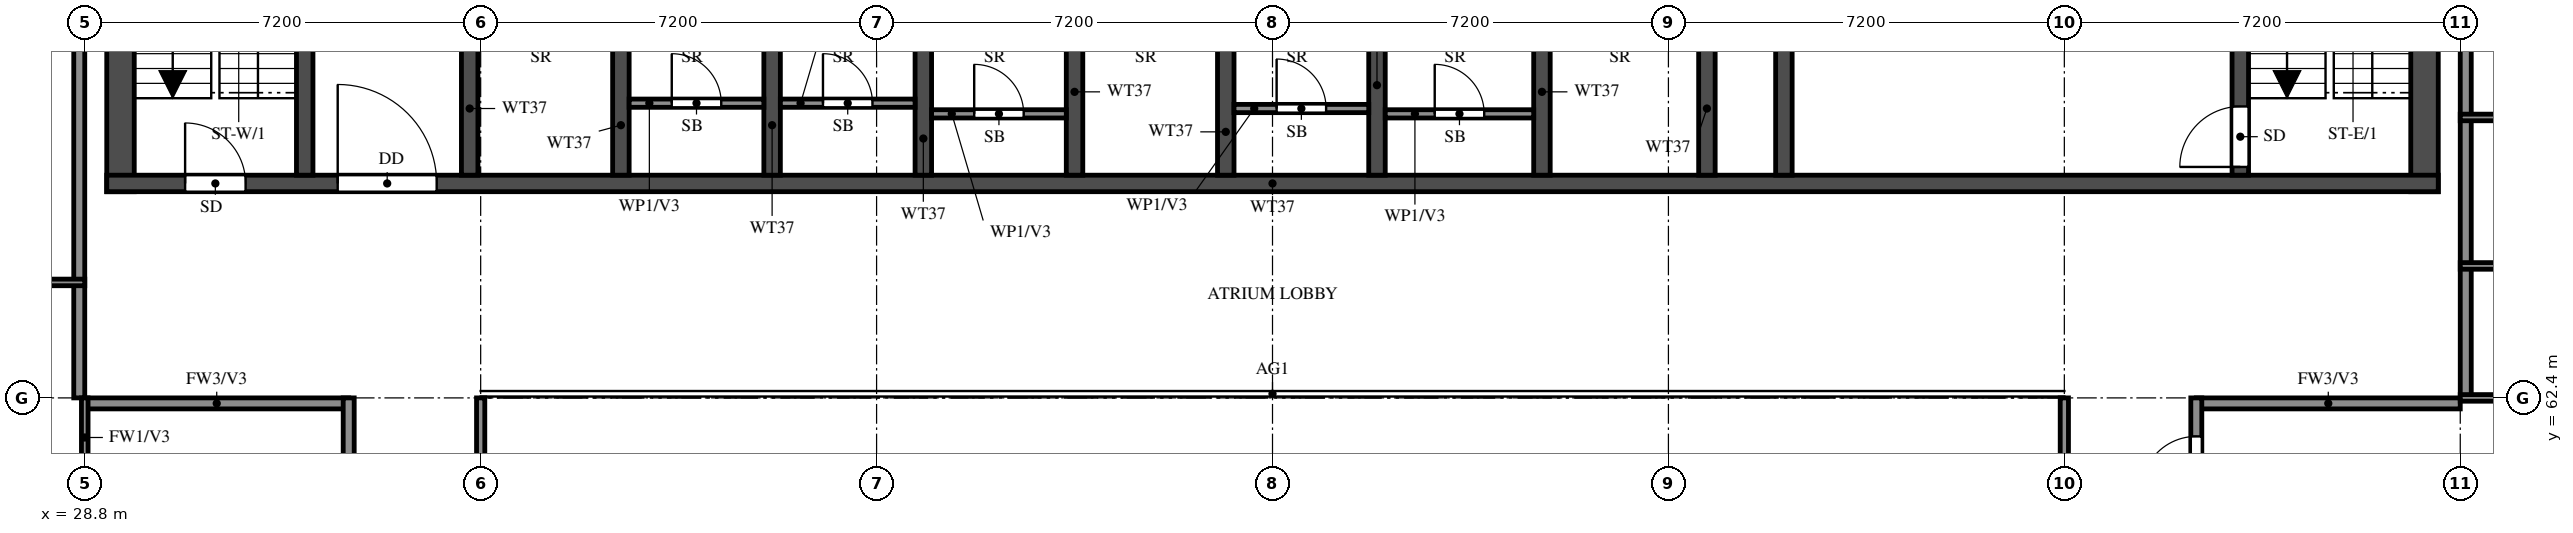
"""IFC4 building model, lengths in metres.
Left out: names, types, materials, properties, quantities, classifications, styles, units other than length and angle.
Written with IfcOpenShell. Run it as: python <this file> out.ifc"""

import sys

from ifc_helpers import new_model, si_unit, direction, frame, frame_2d, origin, place, context, subcontext, project, spatial, rectangle, extrude, element, fill, save


model = new_model("IFC4")
c1 = context("Model", 3, precision=1e-05, world=origin(), true_north=direction((0.0, 1.0)))
c2 = subcontext(c1, "Body", "Model", "MODEL_VIEW")
j1 = project(units=[si_unit("LENGTHUNIT", "METRE"), si_unit("PLANEANGLEUNIT", "RADIAN")], contexts=[c1])
p1 = place(None, origin())
s1 = spatial("IfcSite", under=j1, at=p1, CompositionType="ELEMENT")
p2 = place(p1, origin())
s2 = spatial("IfcBuilding", under=s1, at=p2, CompositionType="ELEMENT")
p3 = place(p2, frame((0.0, 0.0, 253.5)))
s3 = spatial("IfcBuildingStorey", under=s2, at=p3, CompositionType="ELEMENT", Elevation=253.5)
for number, where, z_axis, x_axis in (
    (1, (29.45, 66.15, 0.0), (0.0, 0.0, 1.0), (0.0, 1.0, 0.0)),
    (2, (71.35, 66.15, 0.0), (0.0, 0.0, 1.0), (0.0, 1.0, 0.0)),
):
    element("IfcWall", number, at=place(p3, frame(where, z_axis=z_axis, x_axis=x_axis)), inside=s3, PredefinedType="SHEAR", context=c2, shape_type="SweptSolid", body=[
        extrude(rectangle(XDim=11.85, YDim=0.5, at=frame_2d((5.925, 0.0))), origin(), (0.0, 0.0, 1.0), 3.22),
    ])
p4 = place(p3, frame((29.2, 66.3, 0.0), z_axis=(0.0, 0.0, 1.0), x_axis=(1.0, 0.0, 0.0)))
e3 = element("IfcWall", 3, at=p4, inside=s3, PredefinedType="SHEAR", context=c2, shape_type="SweptSolid", body=[
    extrude(rectangle(XDim=42.4, YDim=0.3, at=frame_2d((21.2, 0.0))), origin(), (0.0, 0.0, 1.0), 3.22),
])
p5 = place(p4, frame((1.425, 0.0, 0.0)))
e4 = element("IfcOpeningElement", 4, at=p5, cuts=e3, PredefinedType="OPENING", context=c2, shape_type="SweptSolid", body=[
    extrude(rectangle(XDim=1.1, YDim=2.1, at=frame_2d((0.55, 1.05))), frame((0.0, 0.16, 0.0), z_axis=(0.0, -1.0, 0.0), x_axis=(1.0, 0.0, 0.0)), (0.0, 0.0, 1.0), 0.32),
])
p6 = place(p4, frame((4.2, 0.0, 0.0)))
e5 = element("IfcOpeningElement", 5, at=p6, cuts=e3, PredefinedType="OPENING", context=c2, shape_type="SweptSolid", body=[
    extrude(rectangle(XDim=1.8, YDim=2.1, at=frame_2d((0.9, 1.05))), frame((0.0, 0.16, 0.0), z_axis=(0.0, -1.0, 0.0), x_axis=(1.0, 0.0, 0.0)), (0.0, 0.0, 1.0), 0.32),
])
p7 = place(p3, frame((32.8, 66.45, 0.0), z_axis=(0.0, 0.0, 1.0), x_axis=(0.0, 1.0, 0.0)))
e6 = element("IfcWall", 6, at=p7, inside=s3, PredefinedType="SHEAR", context=c2, shape_type="SweptSolid", body=[
    extrude(rectangle(XDim=11.05, YDim=0.3, at=frame_2d((5.525, 0.0))), origin(), (0.0, 0.0, 1.0), 3.22),
])
p8 = place(p3, frame((68.0, 66.45, 0.0), z_axis=(0.0, 0.0, 1.0), x_axis=(0.0, 1.0, 0.0)))
e7 = element("IfcWall", 7, at=p8, inside=s3, PredefinedType="SHEAR", context=c2, shape_type="SweptSolid", body=[
    extrude(rectangle(XDim=11.05, YDim=0.3, at=frame_2d((5.525, 0.0))), origin(), (0.0, 0.0, 1.0), 3.22),
])
p9 = place(p8, frame((0.15, 0.0, 0.0)))
e8 = element("IfcOpeningElement", 8, at=p9, cuts=e7, PredefinedType="OPENING", context=c2, shape_type="SweptSolid", body=[
    extrude(rectangle(XDim=1.1, YDim=2.1, at=frame_2d((0.55, 1.05))), frame((0.0, 0.16, 0.0), z_axis=(0.0, -1.0, 0.0), x_axis=(1.0, 0.0, 0.0)), (0.0, 0.0, 1.0), 0.32),
])
p10 = place(p3, frame((59.7, 66.45, 0.0), z_axis=(0.0, 0.0, 1.0), x_axis=(0.0, 1.0, 0.0)))
e9 = element("IfcWall", 9, at=p10, inside=s3, PredefinedType="SHEAR", context=c2, shape_type="SweptSolid", body=[
    extrude(rectangle(XDim=6.175, YDim=0.3, at=frame_2d((3.087, 0.0))), origin(), (0.0, 0.0, 1.0), 3.22),
])
p11 = place(p10, frame((3.85, 0.0, 0.0)))
e10 = element("IfcOpeningElement", 10, at=p11, cuts=e9, PredefinedType="OPENING", context=c2, shape_type="SweptSolid", body=[
    extrude(rectangle(XDim=1.2, YDim=2.1, at=frame_2d((0.6, 1.05))), frame((0.0, 0.16, 0.0), z_axis=(0.0, -1.0, 0.0), x_axis=(1.0, 0.0, 0.0)), (0.0, 0.0, 1.0), 0.32),
])
for number, where, z_axis, x_axis in (
    (11, (35.8, 66.45, 0.0), (0.0, 0.0, 1.0), (0.0, 1.0, 0.0)),
    (12, (38.55, 66.45, 0.0), (0.0, 0.0, 1.0), (0.0, 1.0, 0.0)),
    (13, (41.3, 66.45, 0.0), (0.0, 0.0, 1.0), (0.0, 1.0, 0.0)),
    (14, (44.05, 66.45, 0.0), (0.0, 0.0, 1.0), (0.0, 1.0, 0.0)),
    (15, (46.8, 66.45, 0.0), (0.0, 0.0, 1.0), (0.0, 1.0, 0.0)),
    (16, (49.55, 66.45, 0.0), (0.0, 0.0, 1.0), (0.0, 1.0, 0.0)),
    (17, (52.3, 66.45, 0.0), (0.0, 0.0, 1.0), (0.0, 1.0, 0.0)),
    (18, (55.3, 66.45, 0.0), (0.0, 0.0, 1.0), (0.0, 1.0, 0.0)),
    (19, (58.3, 66.45, 0.0), (0.0, 0.0, 1.0), (0.0, 1.0, 0.0)),
):
    element("IfcWall", number, at=place(p3, frame(where, z_axis=z_axis, x_axis=x_axis)), inside=s3, PredefinedType="SHEAR", context=c2, shape_type="SweptSolid", body=[
        extrude(rectangle(XDim=2.425, YDim=0.3, at=frame_2d((1.212, 0.0))), origin(), (0.0, 0.0, 1.0), 3.22),
    ])
p12 = place(p3, frame((38.7, 67.76, 0.0), z_axis=(0.0, 0.0, 1.0), x_axis=(1.0, 0.0, 0.0)))
e20 = element("IfcWall", 20, at=p12, inside=s3, PredefinedType="PARTITIONING", context=c2, shape_type="SweptSolid", body=[
    extrude(rectangle(XDim=2.45, YDim=0.15, at=frame_2d((1.225, 0.0))), origin(), (0.0, 0.0, 1.0), 3.22),
])
p13 = place(p12, frame((0.775, 0.0, 0.0)))
e21 = element("IfcOpeningElement", 21, at=p13, cuts=e20, PredefinedType="OPENING", context=c2, shape_type="SweptSolid", body=[
    extrude(rectangle(XDim=0.9, YDim=2.1, at=frame_2d((0.45, 1.05))), frame((0.0, 0.085, 0.0), z_axis=(0.0, -1.0, 0.0), x_axis=(1.0, 0.0, 0.0)), (0.0, 0.0, 1.0), 0.17),
])
p14 = place(p3, frame((41.45, 67.76, 0.0), z_axis=(0.0, 0.0, 1.0), x_axis=(1.0, 0.0, 0.0)))
e22 = element("IfcWall", 22, at=p14, inside=s3, PredefinedType="PARTITIONING", context=c2, shape_type="SweptSolid", body=[
    extrude(rectangle(XDim=2.45, YDim=0.15, at=frame_2d((1.225, 0.0))), origin(), (0.0, 0.0, 1.0), 3.22),
])
p15 = place(p14, frame((0.775, 0.0, 0.0)))
e23 = element("IfcOpeningElement", 23, at=p15, cuts=e22, PredefinedType="OPENING", context=c2, shape_type="SweptSolid", body=[
    extrude(rectangle(XDim=0.9, YDim=2.1, at=frame_2d((0.45, 1.05))), frame((0.0, 0.085, 0.0), z_axis=(0.0, -1.0, 0.0), x_axis=(1.0, 0.0, 0.0)), (0.0, 0.0, 1.0), 0.17),
])
p16 = place(p3, frame((44.2, 67.565, 0.0), z_axis=(0.0, 0.0, 1.0), x_axis=(1.0, 0.0, 0.0)))
e24 = element("IfcWall", 24, at=p16, inside=s3, PredefinedType="PARTITIONING", context=c2, shape_type="SweptSolid", body=[
    extrude(rectangle(XDim=2.45, YDim=0.15, at=frame_2d((1.225, 0.0))), origin(), (0.0, 0.0, 1.0), 3.22),
])
p17 = place(p16, frame((0.775, 0.0, 0.0)))
e25 = element("IfcOpeningElement", 25, at=p17, cuts=e24, PredefinedType="OPENING", context=c2, shape_type="SweptSolid", body=[
    extrude(rectangle(XDim=0.9, YDim=2.1, at=frame_2d((0.45, 1.05))), frame((0.0, 0.085, 0.0), z_axis=(0.0, -1.0, 0.0), x_axis=(1.0, 0.0, 0.0)), (0.0, 0.0, 1.0), 0.17),
])
p18 = place(p3, frame((49.7, 67.663, 0.0), z_axis=(0.0, 0.0, 1.0), x_axis=(1.0, 0.0, 0.0)))
e26 = element("IfcWall", 26, at=p18, inside=s3, PredefinedType="PARTITIONING", context=c2, shape_type="SweptSolid", body=[
    extrude(rectangle(XDim=2.45, YDim=0.15, at=frame_2d((1.225, 0.0))), origin(), (0.0, 0.0, 1.0), 3.22),
])
p19 = place(p18, frame((0.775, 0.0, 0.0)))
e27 = element("IfcOpeningElement", 27, at=p19, cuts=e26, PredefinedType="OPENING", context=c2, shape_type="SweptSolid", body=[
    extrude(rectangle(XDim=0.9, YDim=2.1, at=frame_2d((0.45, 1.05))), frame((0.0, 0.085, 0.0), z_axis=(0.0, -1.0, 0.0), x_axis=(1.0, 0.0, 0.0)), (0.0, 0.0, 1.0), 0.17),
])
p20 = place(p3, frame((52.45, 67.565, 0.0), z_axis=(0.0, 0.0, 1.0), x_axis=(1.0, 0.0, 0.0)))
e28 = element("IfcWall", 28, at=p20, inside=s3, PredefinedType="PARTITIONING", context=c2, shape_type="SweptSolid", body=[
    extrude(rectangle(XDim=2.7, YDim=0.15, at=frame_2d((1.35, 0.0))), origin(), (0.0, 0.0, 1.0), 3.22),
])
p21 = place(p20, frame((0.9, 0.0, 0.0)))
e29 = element("IfcOpeningElement", 29, at=p21, cuts=e28, PredefinedType="OPENING", context=c2, shape_type="SweptSolid", body=[
    extrude(rectangle(XDim=0.9, YDim=2.1, at=frame_2d((0.45, 1.05))), frame((0.0, 0.085, 0.0), z_axis=(0.0, -1.0, 0.0), x_axis=(1.0, 0.0, 0.0)), (0.0, 0.0, 1.0), 0.17),
])
for number, where, z_axis, x_axis in (
    (30, (28.8, 62.3, 0.0), (0.0, 0.0, 1.0), (1.0, 0.0, 0.0)),
    (31, (67.2, 62.3, 0.0), (0.0, 0.0, 1.0), (1.0, 0.0, 0.0)),
):
    element("IfcWall", number, at=place(p3, frame(where, z_axis=z_axis, x_axis=x_axis)), inside=s3, PredefinedType="SOLIDWALL", context=c2, shape_type="SweptSolid", body=[
        extrude(rectangle(XDim=4.8, YDim=0.2, at=frame_2d((2.4, 0.0))), origin(), (0.0, 0.0, 1.0), 3.22),
    ])
p22 = place(p3, frame((28.7, 62.4, 0.0), z_axis=(0.0, 0.0, 1.0), x_axis=(0.0, 1.0, 0.0)))
e32 = element("IfcWall", 32, at=p22, inside=s3, PredefinedType="SOLIDWALL", context=c2, shape_type="SweptSolid", body=[
    extrude(rectangle(XDim=15.6, YDim=0.2, at=frame_2d((7.8, 0.0))), origin(), (0.0, 0.0, 1.0), 3.22),
])
p23 = place(p3, frame((33.6, 56.4, 0.0), z_axis=(0.0, 0.0, 1.0), x_axis=(0.0, 1.0, 0.0)))
e33 = element("IfcWall", 33, at=p23, inside=s3, PredefinedType="SOLIDWALL", context=c2, shape_type="SweptSolid", body=[
    extrude(rectangle(XDim=6.0, YDim=0.2, at=frame_2d((3.0, 0.0))), origin(), (0.0, 0.0, 1.0), 3.22),
])
p24 = place(p23, frame((3.7, 0.0, 0.0)))
e34 = element("IfcOpeningElement", 34, at=p24, cuts=e33, PredefinedType="OPENING", context=c2, shape_type="SweptSolid", body=[
    extrude(rectangle(XDim=1.0, YDim=2.1, at=frame_2d((0.5, 1.05))), frame((0.0, 0.11, 0.0), z_axis=(0.0, -1.0, 0.0), x_axis=(1.0, 0.0, 0.0)), (0.0, 0.0, 1.0), 0.22),
])
p25 = place(p3, frame((67.2, 60.0, 0.0), z_axis=(0.0, 0.0, 1.0), x_axis=(0.0, 1.0, 0.0)))
e35 = element("IfcWall", 35, at=p25, inside=s3, PredefinedType="SOLIDWALL", context=c2, shape_type="SweptSolid", body=[
    extrude(rectangle(XDim=2.4, YDim=0.2, at=frame_2d((1.2, 0.0))), origin(), (0.0, 0.0, 1.0), 3.22),
])
p26 = place(p25, frame((0.7, 0.0, 0.0)))
e36 = element("IfcOpeningElement", 36, at=p26, cuts=e35, PredefinedType="OPENING", context=c2, shape_type="SweptSolid", body=[
    extrude(rectangle(XDim=1.0, YDim=2.1, at=frame_2d((0.5, 1.05))), frame((0.0, 0.11, 0.0), z_axis=(0.0, -1.0, 0.0), x_axis=(1.0, 0.0, 0.0)), (0.0, 0.0, 1.0), 0.22),
])
p27 = place(p3, frame((72.1, 62.4, 0.0), z_axis=(0.0, 0.0, 1.0), x_axis=(0.0, 1.0, 0.0)))
e37 = element("IfcWall", 37, at=p27, inside=s3, PredefinedType="SOLIDWALL", context=c2, shape_type="SweptSolid", body=[
    extrude(rectangle(XDim=15.6, YDim=0.2, at=frame_2d((7.8, 0.0))), origin(), (0.0, 0.0, 1.0), 3.22),
])
p28 = place(p3, frame((72.0, 62.4, 0.0), z_axis=(0.0, 0.0, 1.0), x_axis=(1.0, 0.0, 0.0)))
e38 = element("IfcWall", 38, at=p28, inside=s3, PredefinedType="PARTITIONING", context=c2, shape_type="SweptSolid", body=[
    extrude(rectangle(XDim=2.4, YDim=0.12, at=frame_2d((1.2, 0.0))), origin(), (0.0, 0.0, 1.0), 3.22),
])
p29 = place(p28, frame((0.75, 0.0, 0.0)))
e39 = element("IfcOpeningElement", 39, at=p29, cuts=e38, PredefinedType="OPENING", context=c2, shape_type="SweptSolid", body=[
    extrude(rectangle(XDim=0.9, YDim=2.1, at=frame_2d((0.45, 1.05))), frame((0.0, 0.07, 0.0), z_axis=(0.0, -1.0, 0.0), x_axis=(1.0, 0.0, 0.0)), (0.0, 0.0, 1.0), 0.14),
])
p30 = place(p3, frame((25.3, 64.5, 0.0), z_axis=(0.0, 0.0, 1.0), x_axis=(1.0, 0.0, 0.0)))
e40 = element("IfcWall", 40, at=p30, inside=s3, PredefinedType="PARTITIONING", context=c2, shape_type="SweptSolid", body=[
    extrude(rectangle(XDim=3.5, YDim=0.12, at=frame_2d((1.75, 0.0))), origin(), (0.0, 0.0, 1.0), 3.22),
])
p31 = place(p3, frame((72.0, 64.8, 0.0), z_axis=(0.0, 0.0, 1.0), x_axis=(1.0, 0.0, 0.0)))
e41 = element("IfcWall", 41, at=p31, inside=s3, PredefinedType="PARTITIONING", context=c2, shape_type="SweptSolid", body=[
    extrude(rectangle(XDim=3.5, YDim=0.12, at=frame_2d((1.75, 0.0))), origin(), (0.0, 0.0, 1.0), 3.22),
])
p32 = place(p31, frame((1.3, 0.0, 0.0)))
e42 = element("IfcOpeningElement", 42, at=p32, cuts=e41, PredefinedType="OPENING", context=c2, shape_type="SweptSolid", body=[
    extrude(rectangle(XDim=0.9, YDim=2.1, at=frame_2d((0.45, 1.05))), frame((0.0, 0.07, 0.0), z_axis=(0.0, -1.0, 0.0), x_axis=(1.0, 0.0, 0.0)), (0.0, 0.0, 1.0), 0.14),
])
p33 = place(p3, frame((72.0, 67.5, 0.0), z_axis=(0.0, 0.0, 1.0), x_axis=(1.0, 0.0, 0.0)))
e43 = element("IfcWall", 43, at=p33, inside=s3, PredefinedType="PARTITIONING", context=c2, shape_type="SweptSolid", body=[
    extrude(rectangle(XDim=3.5, YDim=0.12, at=frame_2d((1.75, 0.0))), origin(), (0.0, 0.0, 1.0), 3.22),
])
p34 = place(p3, frame((28.8, 58.8, 0.0), z_axis=(0.0, 0.0, 1.0), x_axis=(0.0, 1.0, 0.0)))
e44 = element("IfcWall", 44, at=p34, inside=s3, PredefinedType="PARTITIONING", context=c2, shape_type="SweptSolid", body=[
    extrude(rectangle(XDim=3.6, YDim=0.12, at=frame_2d((1.8, 0.0))), origin(), (0.0, 0.0, 1.0), 3.22),
])
p35 = place(p34, frame((0.75, 0.0, 0.0)))
e45 = element("IfcOpeningElement", 45, at=p35, cuts=e44, PredefinedType="OPENING", context=c2, shape_type="SweptSolid", body=[
    extrude(rectangle(XDim=0.9, YDim=2.1, at=frame_2d((0.45, 1.05))), frame((0.0, 0.07, 0.0), z_axis=(0.0, -1.0, 0.0), x_axis=(1.0, 0.0, 0.0)), (0.0, 0.0, 1.0), 0.14),
])
for number, where, z_axis, x_axis in (
    (46, (36.0, 48.0, 0.0), (0.0, 0.0, 1.0), (0.0, 1.0, 0.0)),
    (47, (64.8, 48.0, 0.0), (0.0, 0.0, 1.0), (0.0, 1.0, 0.0)),
):
    element("IfcWall", number, at=place(p3, frame(where, z_axis=z_axis, x_axis=x_axis)), inside=s3, PredefinedType="SOLIDWALL", context=c2, shape_type="SweptSolid", body=[
        extrude(rectangle(XDim=14.4, YDim=0.15, at=frame_2d((7.2, 0.0))), origin(), (0.0, 0.0, 1.0), 2.32),
    ])
p36 = place(p5, origin())
e48 = element("IfcDoor", 48, at=p36, inside=s3, OperationType="SINGLE_SWING_LEFT", PredefinedType="DOOR", context=c2, shape_type="SweptSolid", body=[
    extrude(rectangle(XDim=1.1, YDim=2.1, at=frame_2d((0.55, 1.05))), frame((0.0, 0.025, 0.0), z_axis=(0.0, -1.0, 0.0), x_axis=(1.0, 0.0, 0.0)), (0.0, 0.0, 1.0), 0.05),
])
fill(e4, e48)
p37 = place(p9, origin())
e49 = element("IfcDoor", 49, at=p37, inside=s3, OperationType="SINGLE_SWING_RIGHT", PredefinedType="DOOR", context=c2, shape_type="SweptSolid", body=[
    extrude(rectangle(XDim=1.1, YDim=2.1, at=frame_2d((0.55, 1.05))), frame((0.0, 0.025, 0.0), z_axis=(0.0, -1.0, 0.0), x_axis=(1.0, 0.0, 0.0)), (0.0, 0.0, 1.0), 0.05),
])
fill(e8, e49)
p38 = place(p6, origin())
e50 = element("IfcDoor", 50, at=p38, inside=s3, OperationType="DOUBLE_DOOR_SINGLE_SWING", PredefinedType="DOOR", context=c2, shape_type="SweptSolid", body=[
    extrude(rectangle(XDim=1.8, YDim=2.1, at=frame_2d((0.9, 1.05))), frame((0.0, 0.025, 0.0), z_axis=(0.0, -1.0, 0.0), x_axis=(1.0, 0.0, 0.0)), (0.0, 0.0, 1.0), 0.05),
])
fill(e5, e50)
p39 = place(p13, origin())
e51 = element("IfcDoor", 51, at=p39, inside=s3, OperationType="SINGLE_SWING_RIGHT", PredefinedType="DOOR", context=c2, shape_type="SweptSolid", body=[
    extrude(rectangle(XDim=0.9, YDim=2.1, at=frame_2d((0.45, 1.05))), frame((0.0, 0.025, 0.0), z_axis=(0.0, -1.0, 0.0), x_axis=(1.0, 0.0, 0.0)), (0.0, 0.0, 1.0), 0.05),
])
fill(e21, e51)
p40 = place(p15, origin())
e52 = element("IfcDoor", 52, at=p40, inside=s3, OperationType="SINGLE_SWING_LEFT", PredefinedType="DOOR", context=c2, shape_type="SweptSolid", body=[
    extrude(rectangle(XDim=0.9, YDim=2.1, at=frame_2d((0.45, 1.05))), frame((0.0, 0.025, 0.0), z_axis=(0.0, -1.0, 0.0), x_axis=(1.0, 0.0, 0.0)), (0.0, 0.0, 1.0), 0.05),
])
fill(e23, e52)
p41 = place(p17, origin())
e53 = element("IfcDoor", 53, at=p41, inside=s3, OperationType="SINGLE_SWING_LEFT", PredefinedType="DOOR", context=c2, shape_type="SweptSolid", body=[
    extrude(rectangle(XDim=0.9, YDim=2.1, at=frame_2d((0.45, 1.05))), frame((0.0, 0.025, 0.0), z_axis=(0.0, -1.0, 0.0), x_axis=(1.0, 0.0, 0.0)), (0.0, 0.0, 1.0), 0.05),
])
fill(e25, e53)
p42 = place(p19, origin())
e54 = element("IfcDoor", 54, at=p42, inside=s3, OperationType="SINGLE_SWING_LEFT", PredefinedType="DOOR", context=c2, shape_type="SweptSolid", body=[
    extrude(rectangle(XDim=0.9, YDim=2.1, at=frame_2d((0.45, 1.05))), frame((0.0, 0.025, 0.0), z_axis=(0.0, -1.0, 0.0), x_axis=(1.0, 0.0, 0.0)), (0.0, 0.0, 1.0), 0.05),
])
fill(e27, e54)
p43 = place(p21, origin())
e55 = element("IfcDoor", 55, at=p43, inside=s3, OperationType="SINGLE_SWING_RIGHT", PredefinedType="DOOR", context=c2, shape_type="SweptSolid", body=[
    extrude(rectangle(XDim=0.9, YDim=2.1, at=frame_2d((0.45, 1.05))), frame((0.0, 0.025, 0.0), z_axis=(0.0, -1.0, 0.0), x_axis=(1.0, 0.0, 0.0)), (0.0, 0.0, 1.0), 0.05),
])
fill(e29, e55)
p44 = place(p26, origin())
e56 = element("IfcDoor", 56, at=p44, inside=s3, OperationType="SINGLE_SWING_LEFT", PredefinedType="DOOR", context=c2, shape_type="SweptSolid", body=[
    extrude(rectangle(XDim=1.0, YDim=2.1, at=frame_2d((0.5, 1.05))), frame((0.0, 0.025, 0.0), z_axis=(0.0, -1.0, 0.0), x_axis=(1.0, 0.0, 0.0)), (0.0, 0.0, 1.0), 0.05),
])
fill(e36, e56)
save(model, sys.argv[1])
